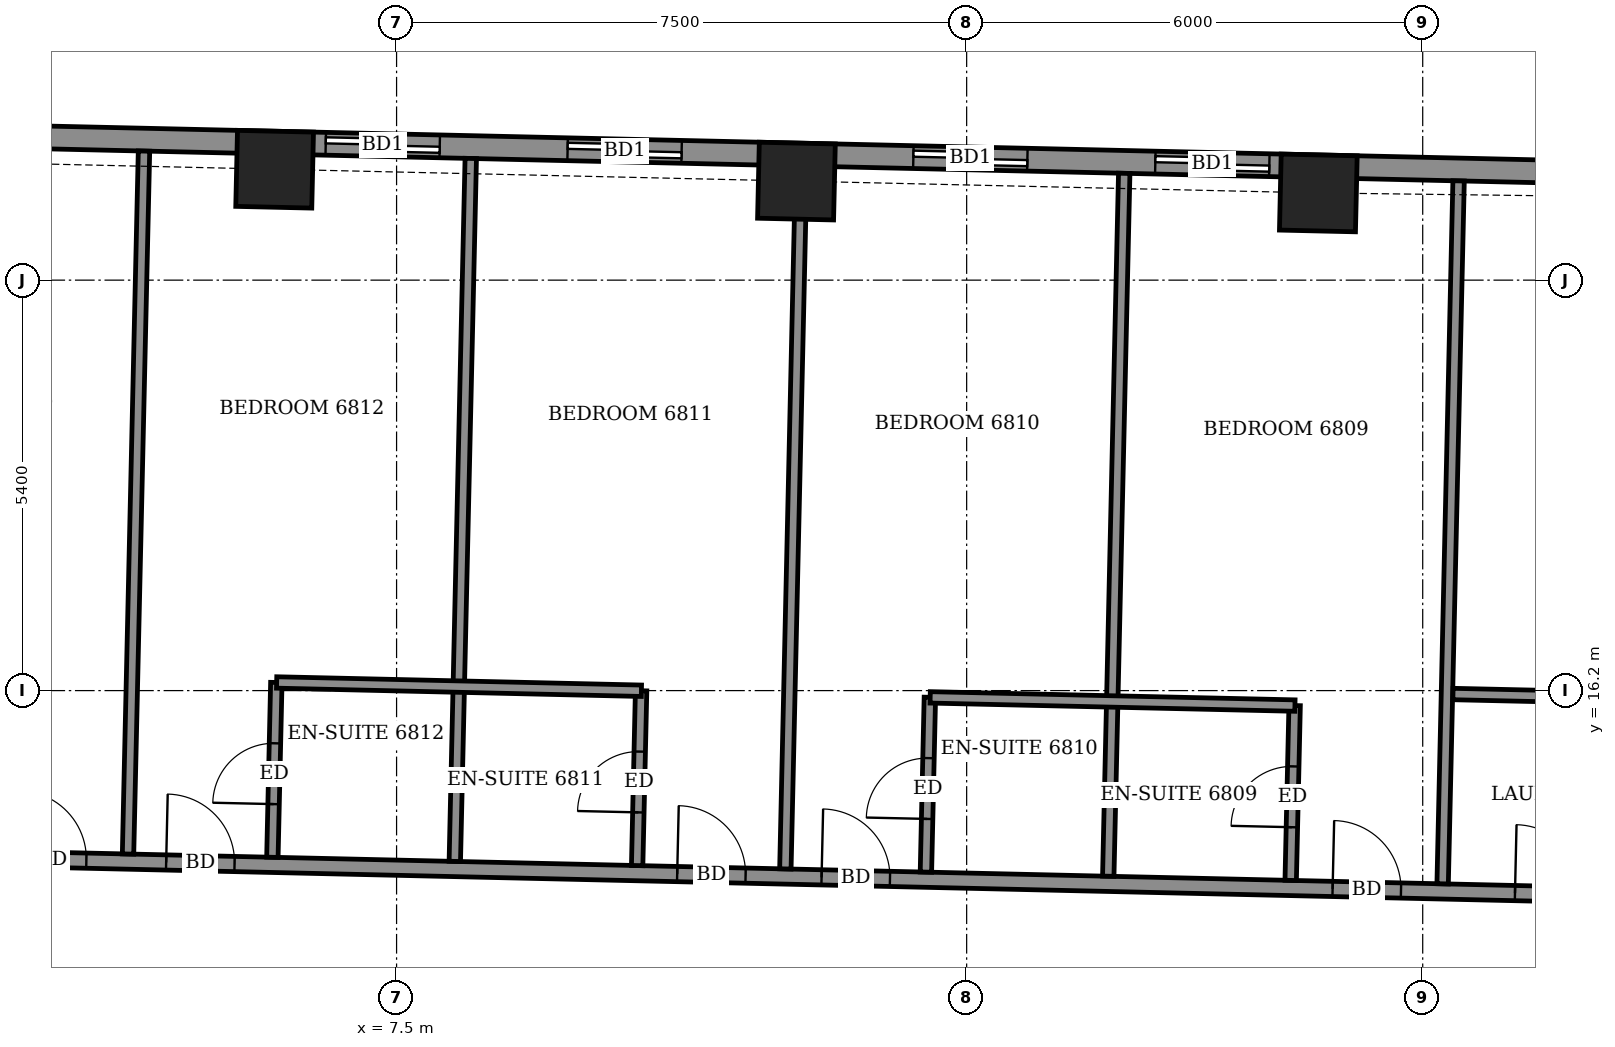
"""IFC4 building model, lengths in metres.
Left out: names, types, materials, properties, quantities, classifications, styles, units other than length and angle.
Written with IfcOpenShell. Run it as: python <this file> out.ifc"""

import sys

from ifc_helpers import new_model, si_unit, direction, frame, frame_2d, origin, origin_2d, place, context, subcontext, project, spatial, rectangle, extrude, element, fill, save


model = new_model("IFC4")
c1 = context("Model", 3, precision=1e-05, world=origin(), true_north=direction((0.0, 1.0)))
c2 = subcontext(c1, "Body", "Model", "MODEL_VIEW")
j1 = project(units=[si_unit("LENGTHUNIT", "METRE"), si_unit("PLANEANGLEUNIT", "RADIAN")], contexts=[c1])
p1 = place(None, origin())
s1 = spatial("IfcSite", under=j1, at=p1, CompositionType="ELEMENT")
p2 = place(p1, origin())
s2 = spatial("IfcBuilding", under=s1, at=p2, CompositionType="ELEMENT")
p3 = place(p2, frame((0.0, 0.0, 268.1)))
s3 = spatial("IfcBuildingStorey", under=s2, at=p3, CompositionType="ELEMENT", Elevation=268.1)
for number, where, z_axis, x_axis in (
    (1, (19.627, 22.747, -0.55), (0.0, 0.0, 1.0), (-1.0, 0.023, 0.0)),
    (2, (12.761, 22.903, -0.55), (0.0, 0.0, 1.0), (-1.0, 0.023, 0.0)),
    (3, (5.896, 23.059, -0.55), (0.0, 0.0, 1.0), (-1.0, 0.023, 0.0)),
):
    element("IfcColumn", number, at=place(p3, frame(where, z_axis=z_axis, x_axis=x_axis)), inside=s3, PredefinedType="COLUMN", context=c2, shape_type="SweptSolid", body=[
        extrude(rectangle(XDim=1.0, YDim=1.0, at=origin_2d()), origin(), (0.0, 0.0, 1.0), 3.6),
    ])
p4 = place(p3, frame((26.35, 22.945, 0.0), z_axis=(0.0, 0.0, 1.0), x_axis=(-0.999742523712, 0.022691105788, 0.0)))
e4 = element("IfcWall", 4, at=p4, inside=s3, PredefinedType="SOLIDWALL", context=c2, shape_type="SweptSolid", body=[
    extrude(rectangle(XDim=47.771, YDim=0.3, at=frame_2d((23.886, 0.0))), origin(), (0.0, 0.0, 1.0), 2.55),
])
p5 = place(p4, frame((1.954, 0.0, 0.0)))
e5 = element("IfcOpeningElement", 5, at=p5, cuts=e4, PredefinedType="OPENING", context=c2, shape_type="SweptSolid", body=[
    extrude(rectangle(XDim=1.5, YDim=2.4, at=frame_2d((0.75, 1.2))), frame((0.0, 0.16, 0.0), z_axis=(0.0, -1.0, 0.0), x_axis=(1.0, 0.0, 0.0)), (0.0, 0.0, 1.0), 0.32),
])
p6 = place(p4, frame((7.37, 0.0, 0.0)))
e6 = element("IfcOpeningElement", 6, at=p6, cuts=e4, PredefinedType="OPENING", context=c2, shape_type="SweptSolid", body=[
    extrude(rectangle(XDim=1.5, YDim=2.4, at=frame_2d((0.75, 1.2))), frame((0.0, 0.16, 0.0), z_axis=(0.0, -1.0, 0.0), x_axis=(1.0, 0.0, 0.0)), (0.0, 0.0, 1.0), 0.32),
])
p7 = place(p4, frame((10.554, 0.0, 0.0)))
e7 = element("IfcOpeningElement", 7, at=p7, cuts=e4, PredefinedType="OPENING", context=c2, shape_type="SweptSolid", body=[
    extrude(rectangle(XDim=1.5, YDim=2.4, at=frame_2d((0.75, 1.2))), frame((0.0, 0.16, 0.0), z_axis=(0.0, -1.0, 0.0), x_axis=(1.0, 0.0, 0.0)), (0.0, 0.0, 1.0), 0.32),
])
p8 = place(p4, frame((15.104, 0.0, 0.0)))
e8 = element("IfcOpeningElement", 8, at=p8, cuts=e4, PredefinedType="OPENING", context=c2, shape_type="SweptSolid", body=[
    extrude(rectangle(XDim=1.5, YDim=2.4, at=frame_2d((0.75, 1.2))), frame((0.0, 0.16, 0.0), z_axis=(0.0, -1.0, 0.0), x_axis=(1.0, 0.0, 0.0)), (0.0, 0.0, 1.0), 0.32),
])
p9 = place(p4, frame((18.287, 0.0, 0.0)))
e9 = element("IfcOpeningElement", 9, at=p9, cuts=e4, PredefinedType="OPENING", context=c2, shape_type="SweptSolid", body=[
    extrude(rectangle(XDim=1.5, YDim=2.4, at=frame_2d((0.75, 1.2))), frame((0.0, 0.16, 0.0), z_axis=(0.0, -1.0, 0.0), x_axis=(1.0, 0.0, 0.0)), (0.0, 0.0, 1.0), 0.32),
])
p10 = place(p4, frame((23.622, 0.0, 0.0)))
e10 = element("IfcOpeningElement", 10, at=p10, cuts=e4, PredefinedType="OPENING", context=c2, shape_type="SweptSolid", body=[
    extrude(rectangle(XDim=1.5, YDim=2.4, at=frame_2d((0.75, 1.2))), frame((0.0, 0.16, 0.0), z_axis=(0.0, -1.0, 0.0), x_axis=(1.0, 0.0, 0.0)), (0.0, 0.0, 1.0), 0.32),
])
p11 = place(p4, frame((28.521, 0.0, 0.0)))
e11 = element("IfcOpeningElement", 11, at=p11, cuts=e4, PredefinedType="OPENING", context=c2, shape_type="SweptSolid", body=[
    extrude(rectangle(XDim=1.5, YDim=2.4, at=frame_2d((0.75, 1.2))), frame((0.0, 0.16, 0.0), z_axis=(0.0, -1.0, 0.0), x_axis=(1.0, 0.0, 0.0)), (0.0, 0.0, 1.0), 0.32),
])
p12 = place(p4, frame((31.705, 0.0, 0.0)))
e12 = element("IfcOpeningElement", 12, at=p12, cuts=e4, PredefinedType="OPENING", context=c2, shape_type="SweptSolid", body=[
    extrude(rectangle(XDim=1.5, YDim=2.4, at=frame_2d((0.75, 1.2))), frame((0.0, 0.16, 0.0), z_axis=(0.0, -1.0, 0.0), x_axis=(1.0, 0.0, 0.0)), (0.0, 0.0, 1.0), 0.32),
])
p13 = place(p4, frame((36.722, 0.0, 0.0)))
e13 = element("IfcOpeningElement", 13, at=p13, cuts=e4, PredefinedType="OPENING", context=c2, shape_type="SweptSolid", body=[
    extrude(rectangle(XDim=1.5, YDim=2.4, at=frame_2d((0.75, 1.2))), frame((0.0, 0.16, 0.0), z_axis=(0.0, -1.0, 0.0), x_axis=(1.0, 0.0, 0.0)), (0.0, 0.0, 1.0), 0.32),
])
p14 = place(p4, frame((41.963, 0.0, 0.0)))
e14 = element("IfcOpeningElement", 14, at=p14, cuts=e4, PredefinedType="OPENING", context=c2, shape_type="SweptSolid", body=[
    extrude(rectangle(XDim=1.5, YDim=2.4, at=frame_2d((0.75, 1.2))), frame((0.0, 0.16, 0.0), z_axis=(0.0, -1.0, 0.0), x_axis=(1.0, 0.0, 0.0)), (0.0, 0.0, 1.0), 0.32),
])
p15 = place(p4, frame((44.436, 0.0, 0.9)))
e15 = element("IfcOpeningElement", 15, at=p15, cuts=e4, PredefinedType="OPENING", context=c2, shape_type="SweptSolid", body=[
    extrude(rectangle(XDim=2.4, YDim=1.5, at=frame_2d((1.2, 0.75))), frame((0.0, 0.16, 0.0), z_axis=(0.0, -1.0, 0.0), x_axis=(1.0, 0.0, 0.0)), (0.0, 0.0, 1.0), 0.32),
])
p16 = place(p3, frame((-24.474, 14.596, 0.0), z_axis=(0.0, 0.0, 1.0), x_axis=(0.999742424031, -0.022695497208, 0.0)))
e16 = element("IfcWall", 16, at=p16, inside=s3, PredefinedType="PARTITIONING", context=c2, shape_type="SweptSolid", body=[
    extrude(rectangle(XDim=52.872, YDim=0.2, at=frame_2d((26.436, 0.0))), origin(), (0.0, 0.0, 1.0), 3.05),
])
p17 = place(p16, frame((51.161, 0.0, 0.0)))
e17 = element("IfcOpeningElement", 17, at=p17, cuts=e16, PredefinedType="OPENING", context=c2, shape_type="SweptSolid", body=[
    extrude(rectangle(XDim=1.0, YDim=2.1, at=frame_2d((0.5, 1.05))), frame((0.0, 0.11, 0.0), z_axis=(0.0, -1.0, 0.0), x_axis=(1.0, 0.0, 0.0)), (0.0, 0.0, 1.0), 0.22),
])
p18 = place(p16, frame((46.7, 0.0, 0.0)))
e18 = element("IfcOpeningElement", 18, at=p18, cuts=e16, PredefinedType="OPENING", context=c2, shape_type="SweptSolid", body=[
    extrude(rectangle(XDim=0.9, YDim=2.1, at=frame_2d((0.45, 1.05))), frame((0.0, 0.11, 0.0), z_axis=(0.0, -1.0, 0.0), x_axis=(1.0, 0.0, 0.0)), (0.0, 0.0, 1.0), 0.22),
])
p19 = place(p16, frame((44.3, 0.0, 0.0)))
e19 = element("IfcOpeningElement", 19, at=p19, cuts=e16, PredefinedType="OPENING", context=c2, shape_type="SweptSolid", body=[
    extrude(rectangle(XDim=0.9, YDim=2.1, at=frame_2d((0.45, 1.05))), frame((0.0, 0.11, 0.0), z_axis=(0.0, -1.0, 0.0), x_axis=(1.0, 0.0, 0.0)), (0.0, 0.0, 1.0), 0.22),
])
p20 = place(p16, frame((37.575, 0.0, 0.0)))
e20 = element("IfcOpeningElement", 20, at=p20, cuts=e16, PredefinedType="OPENING", context=c2, shape_type="SweptSolid", body=[
    extrude(rectangle(XDim=0.9, YDim=2.1, at=frame_2d((0.45, 1.05))), frame((0.0, 0.11, 0.0), z_axis=(0.0, -1.0, 0.0), x_axis=(1.0, 0.0, 0.0)), (0.0, 0.0, 1.0), 0.22),
])
p21 = place(p16, frame((35.675, 0.0, 0.0)))
e21 = element("IfcOpeningElement", 21, at=p21, cuts=e16, PredefinedType="OPENING", context=c2, shape_type="SweptSolid", body=[
    extrude(rectangle(XDim=0.9, YDim=2.1, at=frame_2d((0.45, 1.05))), frame((0.0, 0.11, 0.0), z_axis=(0.0, -1.0, 0.0), x_axis=(1.0, 0.0, 0.0)), (0.0, 0.0, 1.0), 0.22),
])
p22 = place(p16, frame((28.95, 0.0, 0.0)))
e22 = element("IfcOpeningElement", 22, at=p22, cuts=e16, PredefinedType="OPENING", context=c2, shape_type="SweptSolid", body=[
    extrude(rectangle(XDim=0.9, YDim=2.1, at=frame_2d((0.45, 1.05))), frame((0.0, 0.11, 0.0), z_axis=(0.0, -1.0, 0.0), x_axis=(1.0, 0.0, 0.0)), (0.0, 0.0, 1.0), 0.22),
])
p23 = place(p16, frame((27.0, 0.0, 0.0)))
e23 = element("IfcOpeningElement", 23, at=p23, cuts=e16, PredefinedType="OPENING", context=c2, shape_type="SweptSolid", body=[
    extrude(rectangle(XDim=0.9, YDim=2.1, at=frame_2d((0.45, 1.05))), frame((0.0, 0.11, 0.0), z_axis=(0.0, -1.0, 0.0), x_axis=(1.0, 0.0, 0.0)), (0.0, 0.0, 1.0), 0.22),
])
p24 = place(p16, frame((20.2, 0.0, 0.0)))
e24 = element("IfcOpeningElement", 24, at=p24, cuts=e16, PredefinedType="OPENING", context=c2, shape_type="SweptSolid", body=[
    extrude(rectangle(XDim=0.9, YDim=2.1, at=frame_2d((0.45, 1.05))), frame((0.0, 0.11, 0.0), z_axis=(0.0, -1.0, 0.0), x_axis=(1.0, 0.0, 0.0)), (0.0, 0.0, 1.0), 0.22),
])
p25 = place(p16, frame((18.25, 0.0, 0.0)))
e25 = element("IfcOpeningElement", 25, at=p25, cuts=e16, PredefinedType="OPENING", context=c2, shape_type="SweptSolid", body=[
    extrude(rectangle(XDim=0.9, YDim=2.1, at=frame_2d((0.45, 1.05))), frame((0.0, 0.11, 0.0), z_axis=(0.0, -1.0, 0.0), x_axis=(1.0, 0.0, 0.0)), (0.0, 0.0, 1.0), 0.22),
])
p26 = place(p16, frame((11.5, 0.0, 0.0)))
e26 = element("IfcOpeningElement", 26, at=p26, cuts=e16, PredefinedType="OPENING", context=c2, shape_type="SweptSolid", body=[
    extrude(rectangle(XDim=0.9, YDim=2.1, at=frame_2d((0.45, 1.05))), frame((0.0, 0.11, 0.0), z_axis=(0.0, -1.0, 0.0), x_axis=(1.0, 0.0, 0.0)), (0.0, 0.0, 1.0), 0.22),
])
p27 = place(p16, frame((9.475, 0.0, 0.0)))
e27 = element("IfcOpeningElement", 27, at=p27, cuts=e16, PredefinedType="OPENING", context=c2, shape_type="SweptSolid", body=[
    extrude(rectangle(XDim=0.9, YDim=2.1, at=frame_2d((0.45, 1.05))), frame((0.0, 0.11, 0.0), z_axis=(0.0, -1.0, 0.0), x_axis=(1.0, 0.0, 0.0)), (0.0, 0.0, 1.0), 0.22),
])
p28 = place(p16, frame((2.293, 0.0, 0.0)))
e28 = element("IfcOpeningElement", 28, at=p28, cuts=e16, PredefinedType="OPENING", context=c2, shape_type="SweptSolid", body=[
    extrude(rectangle(XDim=1.0, YDim=2.1, at=frame_2d((0.5, 1.05))), frame((0.0, 0.11, 0.0), z_axis=(0.0, -1.0, 0.0), x_axis=(1.0, 0.0, 0.0)), (0.0, 0.0, 1.0), 0.22),
])
p29 = place(p3, frame((3.967, 14.05, 0.0), z_axis=(0.0, 0.0, 1.0), x_axis=(0.022697424684, 0.999742380272, 0.0)))
e29 = element("IfcWall", 29, at=p29, inside=s3, PredefinedType="PARTITIONING", context=c2, shape_type="SweptSolid", body=[
    extrude(rectangle(XDim=9.25, YDim=0.15, at=frame_2d((4.625, 0.0))), origin(), (0.0, 0.0, 1.0), 2.55),
])
p30 = place(p3, frame((5.866, 14.007, 0.0), z_axis=(0.0, 0.0, 1.0), x_axis=(0.022605686808, 0.999744458811, 0.0)))
e30 = element("IfcWall", 30, at=p30, inside=s3, PredefinedType="PARTITIONING", context=c2, shape_type="SweptSolid", body=[
    extrude(rectangle(XDim=2.3, YDim=0.15, at=frame_2d((1.15, 0.0))), origin(), (0.0, 0.0, 1.0), 3.05),
])
p31 = place(p30, frame((0.7, 0.0, 0.0)))
e31 = element("IfcOpeningElement", 31, at=p31, cuts=e30, PredefinedType="OPENING", context=c2, shape_type="SweptSolid", body=[
    extrude(rectangle(XDim=0.8, YDim=2.1, at=frame_2d((0.4, 1.05))), frame((0.0, 0.085, 0.0), z_axis=(0.0, -1.0, 0.0), x_axis=(1.0, 0.0, 0.0)), (0.0, 0.0, 1.0), 0.17),
])
p32 = place(p3, frame((8.266, 13.953, 0.0), z_axis=(0.0, 0.0, 1.0), x_axis=(0.022697424684, 0.999742380272, 0.0)))
e32 = element("IfcWall", 32, at=p32, inside=s3, PredefinedType="PARTITIONING", context=c2, shape_type="SweptSolid", body=[
    extrude(rectangle(XDim=9.25, YDim=0.15, at=frame_2d((4.625, 0.0))), origin(), (0.0, 0.0, 1.0), 2.55),
])
p33 = place(p3, frame((10.665, 13.898, 0.0), z_axis=(0.0, 0.0, 1.0), x_axis=(0.022603288534, 0.999744513037, 0.0)))
e33 = element("IfcWall", 33, at=p33, inside=s3, PredefinedType="PARTITIONING", context=c2, shape_type="SweptSolid", body=[
    extrude(rectangle(XDim=2.301, YDim=0.15, at=frame_2d((1.15, 0.0))), origin(), (0.0, 0.0, 1.0), 3.05),
])
p34 = place(p33, frame((0.7, 0.0, 0.0)))
e34 = element("IfcOpeningElement", 34, at=p34, cuts=e33, PredefinedType="OPENING", context=c2, shape_type="SweptSolid", body=[
    extrude(rectangle(XDim=0.8, YDim=2.1, at=frame_2d((0.4, 1.05))), frame((0.0, 0.085, 0.0), z_axis=(0.0, -1.0, 0.0), x_axis=(1.0, 0.0, 0.0)), (0.0, 0.0, 1.0), 0.17),
])
p35 = place(p3, frame((12.615, 13.854, 0.0), z_axis=(0.0, 0.0, 1.0), x_axis=(0.022591909275, 0.999744770247, 0.0)))
e35 = element("IfcWall", 35, at=p35, inside=s3, PredefinedType="PARTITIONING", context=c2, shape_type="SweptSolid", body=[
    extrude(rectangle(XDim=9.25, YDim=0.15, at=frame_2d((4.625, 0.0))), origin(), (0.0, 0.0, 1.0), 3.05),
])
p36 = place(p3, frame((14.464, 13.812, 0.0), z_axis=(0.0, 0.0, 1.0), x_axis=(0.022603288534, 0.999744513037, 0.0)))
e36 = element("IfcWall", 36, at=p36, inside=s3, PredefinedType="PARTITIONING", context=c2, shape_type="SweptSolid", body=[
    extrude(rectangle(XDim=2.301, YDim=0.15, at=frame_2d((1.15, 0.0))), origin(), (0.0, 0.0, 1.0), 3.05),
])
p37 = place(p36, frame((0.7, 0.0, 0.0)))
e37 = element("IfcOpeningElement", 37, at=p37, cuts=e36, PredefinedType="OPENING", context=c2, shape_type="SweptSolid", body=[
    extrude(rectangle(XDim=0.8, YDim=2.1, at=frame_2d((0.4, 1.05))), frame((0.0, 0.085, 0.0), z_axis=(0.0, -1.0, 0.0), x_axis=(1.0, 0.0, 0.0)), (0.0, 0.0, 1.0), 0.17),
])
p38 = place(p3, frame((16.863, 13.758, 0.0), z_axis=(0.0, 0.0, 1.0), x_axis=(0.0227004195, 0.999742312276, 0.0)))
e38 = element("IfcWall", 38, at=p38, inside=s3, PredefinedType="PARTITIONING", context=c2, shape_type="SweptSolid", body=[
    extrude(rectangle(XDim=9.249, YDim=0.15, at=frame_2d((4.625, 0.0))), origin(), (0.0, 0.0, 1.0), 2.55),
])
p39 = place(p3, frame((19.263, 13.703, 0.0), z_axis=(0.0, 0.0, 1.0), x_axis=(0.022603288534, 0.999744513037, 0.0)))
e39 = element("IfcWall", 39, at=p39, inside=s3, PredefinedType="PARTITIONING", context=c2, shape_type="SweptSolid", body=[
    extrude(rectangle(XDim=2.301, YDim=0.15, at=frame_2d((1.15, 0.0))), origin(), (0.0, 0.0, 1.0), 3.05),
])
p40 = place(p39, frame((0.7, 0.0, 0.0)))
e40 = element("IfcOpeningElement", 40, at=p40, cuts=e39, PredefinedType="OPENING", context=c2, shape_type="SweptSolid", body=[
    extrude(rectangle(XDim=0.8, YDim=2.1, at=frame_2d((0.4, 1.05))), frame((0.0, 0.085, 0.0), z_axis=(0.0, -1.0, 0.0), x_axis=(1.0, 0.0, 0.0)), (0.0, 0.0, 1.0), 0.17),
])
p41 = place(p3, frame((21.262, 13.658, 0.0), z_axis=(0.0, 0.0, 1.0), x_axis=(0.022697424684, 0.999742380272, 0.0)))
e41 = element("IfcWall", 41, at=p41, inside=s3, PredefinedType="PARTITIONING", context=c2, shape_type="SweptSolid", body=[
    extrude(rectangle(XDim=9.25, YDim=0.15, at=frame_2d((4.625, 0.0))), origin(), (0.0, 0.0, 1.0), 2.55),
])
p42 = place(p3, frame((5.922, 16.307, 0.0), z_axis=(0.0, 0.0, 1.0), x_axis=(0.999742675121, -0.022684433919, 0.0)))
e42 = element("IfcWall", 42, at=p42, inside=s3, PredefinedType="PARTITIONING", context=c2, shape_type="SweptSolid", body=[
    extrude(rectangle(XDim=4.8, YDim=0.15, at=frame_2d((2.4, 0.0))), origin(), (0.0, 0.0, 1.0), 3.05),
])
p43 = place(p3, frame((14.52, 16.111, 0.0), z_axis=(0.0, 0.0, 1.0), x_axis=(0.999746149754, -0.022530780096, 0.0)))
e43 = element("IfcWall", 43, at=p43, inside=s3, PredefinedType="PARTITIONING", context=c2, shape_type="SweptSolid", body=[
    extrude(rectangle(XDim=4.8, YDim=0.15, at=frame_2d((2.4, 0.0))), origin(), (0.0, 0.0, 1.0), 3.05),
])
p44 = place(p3, frame((21.398, 16.155, 0.0), z_axis=(0.0, 0.0, 1.0), x_axis=(0.999749092391, -0.022399827308, 0.0)))
e44 = element("IfcWall", 44, at=p44, inside=s3, PredefinedType="PARTITIONING", context=c2, shape_type="SweptSolid", body=[
    extrude(rectangle(XDim=2.725, YDim=0.15, at=frame_2d((1.362, 0.0))), origin(), (0.0, 0.0, 1.0), 3.05),
])
p45 = place(p6, origin())
e45 = element("IfcDoor", 45, at=p45, inside=s3, OperationType="SLIDING_TO_LEFT", PredefinedType="DOOR", context=c2, shape_type="SweptSolid", body=[
    extrude(rectangle(XDim=1.5, YDim=2.4, at=frame_2d((0.75, 1.2))), frame((0.0, 0.025, 0.0), z_axis=(0.0, -1.0, 0.0), x_axis=(1.0, 0.0, 0.0)), (0.0, 0.0, 1.0), 0.05),
])
fill(e6, e45)
p46 = place(p7, origin())
e46 = element("IfcDoor", 46, at=p46, inside=s3, OperationType="SLIDING_TO_LEFT", PredefinedType="DOOR", context=c2, shape_type="SweptSolid", body=[
    extrude(rectangle(XDim=1.5, YDim=2.4, at=frame_2d((0.75, 1.2))), frame((0.0, 0.025, 0.0), z_axis=(0.0, -1.0, 0.0), x_axis=(1.0, 0.0, 0.0)), (0.0, 0.0, 1.0), 0.05),
])
fill(e7, e46)
p47 = place(p8, origin())
e47 = element("IfcDoor", 47, at=p47, inside=s3, OperationType="SLIDING_TO_LEFT", PredefinedType="DOOR", context=c2, shape_type="SweptSolid", body=[
    extrude(rectangle(XDim=1.5, YDim=2.4, at=frame_2d((0.75, 1.2))), frame((0.0, 0.025, 0.0), z_axis=(0.0, -1.0, 0.0), x_axis=(1.0, 0.0, 0.0)), (0.0, 0.0, 1.0), 0.05),
])
fill(e8, e47)
p48 = place(p9, origin())
e48 = element("IfcDoor", 48, at=p48, inside=s3, OperationType="SLIDING_TO_LEFT", PredefinedType="DOOR", context=c2, shape_type="SweptSolid", body=[
    extrude(rectangle(XDim=1.5, YDim=2.4, at=frame_2d((0.75, 1.2))), frame((0.0, 0.025, 0.0), z_axis=(0.0, -1.0, 0.0), x_axis=(1.0, 0.0, 0.0)), (0.0, 0.0, 1.0), 0.05),
])
fill(e9, e48)
p49 = place(p18, origin())
e49 = element("IfcDoor", 49, at=p49, inside=s3, OperationType="SINGLE_SWING_RIGHT", PredefinedType="DOOR", context=c2, shape_type="SweptSolid", body=[
    extrude(rectangle(XDim=0.9, YDim=2.1, at=frame_2d((0.45, 1.05))), frame((0.0, 0.025, 0.0), z_axis=(0.0, -1.0, 0.0), x_axis=(1.0, 0.0, 0.0)), (0.0, 0.0, 1.0), 0.05),
])
fill(e18, e49)
p50 = place(p19, origin())
e50 = element("IfcDoor", 50, at=p50, inside=s3, OperationType="SINGLE_SWING_LEFT", PredefinedType="DOOR", context=c2, shape_type="SweptSolid", body=[
    extrude(rectangle(XDim=0.9, YDim=2.1, at=frame_2d((0.45, 1.05))), frame((0.0, 0.025, 0.0), z_axis=(0.0, -1.0, 0.0), x_axis=(1.0, 0.0, 0.0)), (0.0, 0.0, 1.0), 0.05),
])
fill(e19, e50)
p51 = place(p40, origin())
e51 = element("IfcDoor", 51, at=p51, inside=s3, OperationType="SINGLE_SWING_LEFT", PredefinedType="DOOR", context=c2, shape_type="SweptSolid", body=[
    extrude(rectangle(XDim=0.8, YDim=2.1, at=frame_2d((0.4, 1.05))), frame((0.0, 0.025, 0.0), z_axis=(0.0, -1.0, 0.0), x_axis=(1.0, 0.0, 0.0)), (0.0, 0.0, 1.0), 0.05),
])
fill(e40, e51)
p52 = place(p20, origin())
e52 = element("IfcDoor", 52, at=p52, inside=s3, OperationType="SINGLE_SWING_RIGHT", PredefinedType="DOOR", context=c2, shape_type="SweptSolid", body=[
    extrude(rectangle(XDim=0.9, YDim=2.1, at=frame_2d((0.45, 1.05))), frame((0.0, 0.025, 0.0), z_axis=(0.0, -1.0, 0.0), x_axis=(1.0, 0.0, 0.0)), (0.0, 0.0, 1.0), 0.05),
])
fill(e20, e52)
p53 = place(p37, origin())
e53 = element("IfcDoor", 53, at=p53, inside=s3, OperationType="SINGLE_SWING_RIGHT", PredefinedType="DOOR", context=c2, shape_type="SweptSolid", body=[
    extrude(rectangle(XDim=0.8, YDim=2.1, at=frame_2d((0.4, 1.05))), frame((0.0, 0.025, 0.0), z_axis=(0.0, -1.0, 0.0), x_axis=(1.0, 0.0, 0.0)), (0.0, 0.0, 1.0), 0.05),
])
fill(e37, e53)
p54 = place(p21, origin())
e54 = element("IfcDoor", 54, at=p54, inside=s3, OperationType="SINGLE_SWING_LEFT", PredefinedType="DOOR", context=c2, shape_type="SweptSolid", body=[
    extrude(rectangle(XDim=0.9, YDim=2.1, at=frame_2d((0.45, 1.05))), frame((0.0, 0.025, 0.0), z_axis=(0.0, -1.0, 0.0), x_axis=(1.0, 0.0, 0.0)), (0.0, 0.0, 1.0), 0.05),
])
fill(e21, e54)
p55 = place(p34, origin())
e55 = element("IfcDoor", 55, at=p55, inside=s3, OperationType="SINGLE_SWING_LEFT", PredefinedType="DOOR", context=c2, shape_type="SweptSolid", body=[
    extrude(rectangle(XDim=0.8, YDim=2.1, at=frame_2d((0.4, 1.05))), frame((0.0, 0.025, 0.0), z_axis=(0.0, -1.0, 0.0), x_axis=(1.0, 0.0, 0.0)), (0.0, 0.0, 1.0), 0.05),
])
fill(e34, e55)
p56 = place(p22, origin())
e56 = element("IfcDoor", 56, at=p56, inside=s3, OperationType="SINGLE_SWING_RIGHT", PredefinedType="DOOR", context=c2, shape_type="SweptSolid", body=[
    extrude(rectangle(XDim=0.9, YDim=2.1, at=frame_2d((0.45, 1.05))), frame((0.0, 0.025, 0.0), z_axis=(0.0, -1.0, 0.0), x_axis=(1.0, 0.0, 0.0)), (0.0, 0.0, 1.0), 0.05),
])
fill(e22, e56)
p57 = place(p31, origin())
e57 = element("IfcDoor", 57, at=p57, inside=s3, OperationType="SINGLE_SWING_RIGHT", PredefinedType="DOOR", context=c2, shape_type="SweptSolid", body=[
    extrude(rectangle(XDim=0.8, YDim=2.1, at=frame_2d((0.4, 1.05))), frame((0.0, 0.025, 0.0), z_axis=(0.0, -1.0, 0.0), x_axis=(1.0, 0.0, 0.0)), (0.0, 0.0, 1.0), 0.05),
])
fill(e31, e57)
p58 = place(p23, origin())
e58 = element("IfcDoor", 58, at=p58, inside=s3, OperationType="SINGLE_SWING_LEFT", PredefinedType="DOOR", context=c2, shape_type="SweptSolid", body=[
    extrude(rectangle(XDim=0.9, YDim=2.1, at=frame_2d((0.45, 1.05))), frame((0.0, 0.025, 0.0), z_axis=(0.0, -1.0, 0.0), x_axis=(1.0, 0.0, 0.0)), (0.0, 0.0, 1.0), 0.05),
])
fill(e23, e58)
save(model, sys.argv[1])
